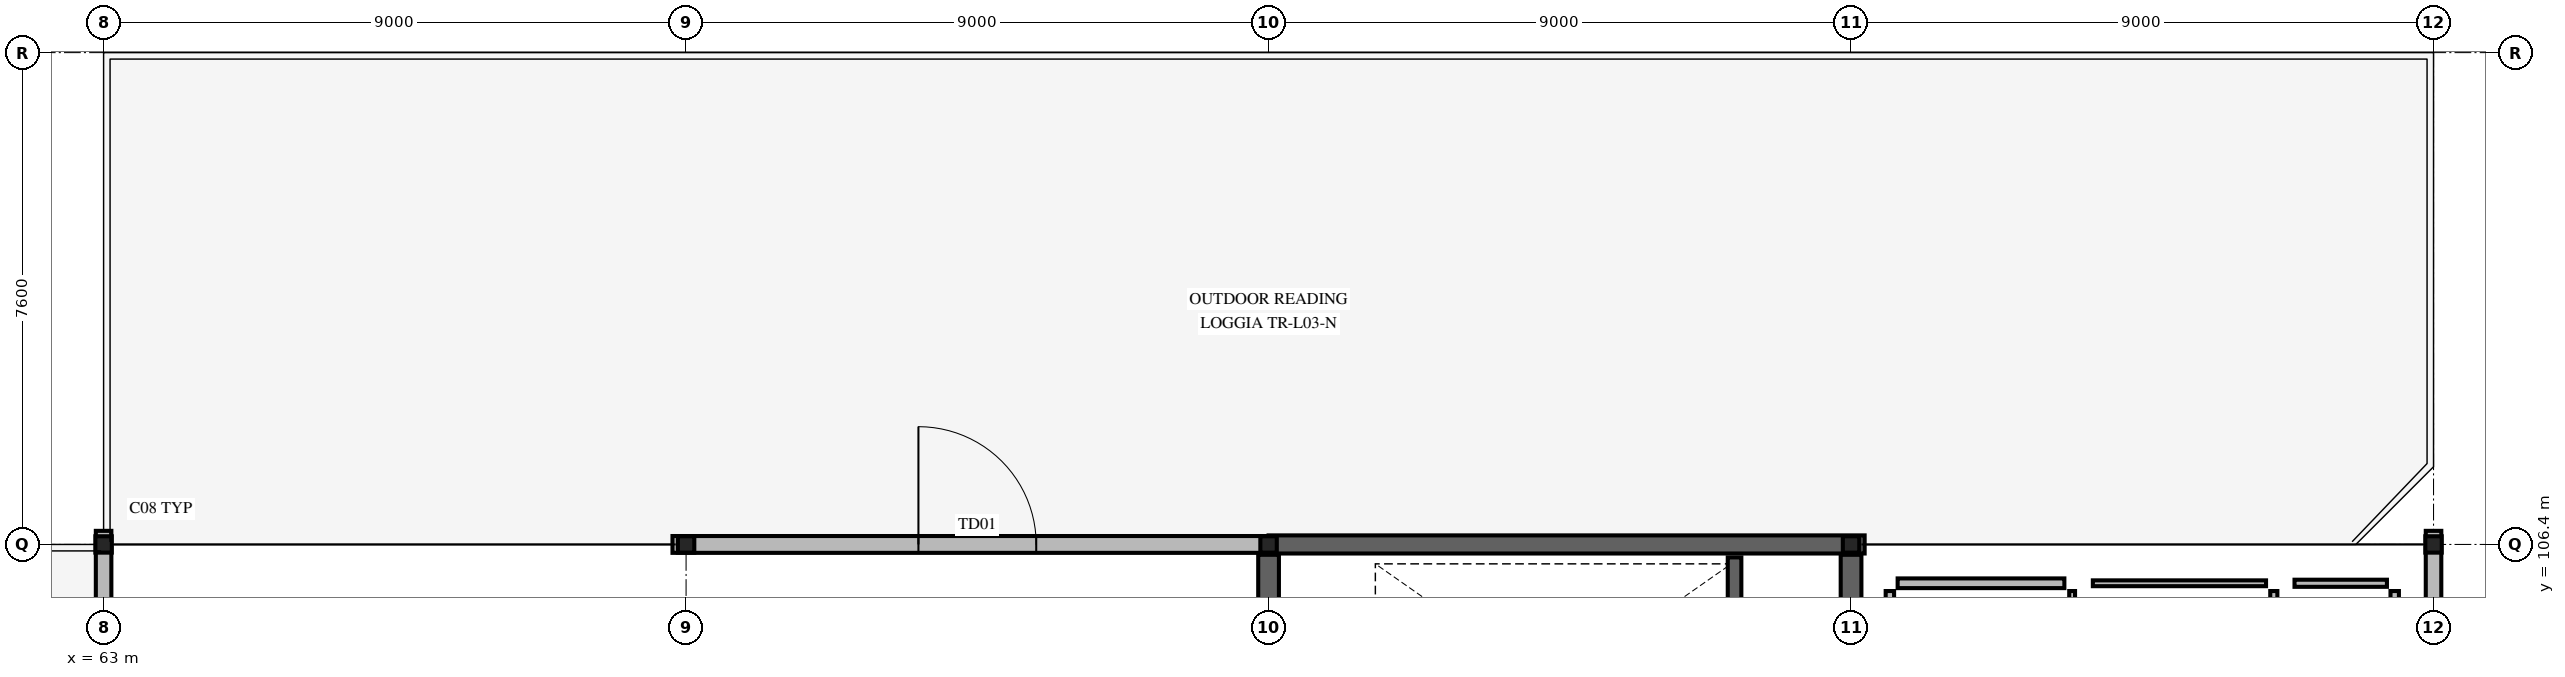
"""IFC4 building model, lengths in metres.
Left out: names, types, materials, properties, quantities, classifications, styles, units other than length and angle.
Written with IfcOpenShell. Run it as: python <this file> out.ifc"""

import sys

from ifc_helpers import new_model, si_unit, direction, frame, frame_2d, origin, origin_2d, place, context, subcontext, project, spatial, rectangle, i_section, extrude, element, fill, save


model = new_model("IFC4")
c1 = context("Model", 3, precision=1e-05, world=origin(), true_north=direction((0.0, 1.0)))
c2 = subcontext(c1, "Body", "Model", "MODEL_VIEW")
j1 = project(units=[si_unit("LENGTHUNIT", "METRE"), si_unit("PLANEANGLEUNIT", "RADIAN")], contexts=[c1])
p1 = place(None, origin())
s1 = spatial("IfcSite", under=j1, at=p1, CompositionType="ELEMENT")
p2 = place(p1, origin())
s2 = spatial("IfcBuilding", under=s1, at=p2, CompositionType="ELEMENT")
p3 = place(p2, frame((0.0, 0.0, 13.68)))
s3 = spatial("IfcBuildingStorey", under=s2, at=p3, CompositionType="ELEMENT", Elevation=13.68)
for number, where, z_axis, x_axis in (
    (1, (63.0, 106.4, 0.0), (0.0, 0.0, 1.0), (1.0, 0.0, 0.0)),
    (2, (72.0, 106.4, 0.0), (0.0, 0.0, 1.0), (1.0, 0.0, 0.0)),
    (3, (81.0, 106.4, 0.0), (0.0, 0.0, 1.0), (1.0, 0.0, 0.0)),
    (4, (90.0, 106.4, 0.0), (0.0, 0.0, 1.0), (1.0, 0.0, 0.0)),
    (5, (99.0, 106.4, 0.0), (0.0, 0.0, 1.0), (1.0, 0.0, 0.0)),
):
    element("IfcColumn", number, at=place(p3, frame(where, z_axis=z_axis, x_axis=x_axis)), inside=s3, PredefinedType="COLUMN", context=c2, shape_type="SweptSolid", body=[
        extrude(i_section(OverallWidth=0.254, OverallDepth=0.253, WebThickness=0.009, FlangeThickness=0.014, FilletRadius=0.012, at=origin_2d()), origin(), (0.0, 0.0, 1.0), 7.47),
    ])
p4 = place(p3, frame((71.79, 106.4, 0.0), z_axis=(0.0, 0.0, 1.0), x_axis=(1.0, 0.0, 0.0)))
e6 = element("IfcWall", 6, at=p4, inside=s3, PredefinedType="STANDARD", context=c2, shape_type="SweptSolid", body=[
    extrude(rectangle(XDim=9.21, YDim=0.26, at=frame_2d((4.605, 0.0))), origin(), (0.0, 0.0, 1.0), 4.08),
])
p5 = place(p4, frame((3.8, 0.0, 0.0)))
e7 = element("IfcOpeningElement", 7, at=p5, cuts=e6, PredefinedType="OPENING", context=c2, shape_type="SweptSolid", body=[
    extrude(rectangle(XDim=1.82, YDim=2.2, at=frame_2d((0.91, 1.1))), frame((0.0, 0.14, 0.0), z_axis=(0.0, -1.0, 0.0), x_axis=(1.0, 0.0, 0.0)), (0.0, 0.0, 1.0), 0.28),
])
p6 = place(p3, frame((81.0, 106.4, 0.0), z_axis=(0.0, 0.0, 1.0), x_axis=(1.0, 0.0, 0.0)))
e8 = element("IfcWall", 8, at=p6, inside=s3, PredefinedType="SOLIDWALL", context=c2, shape_type="SweptSolid", body=[
    extrude(rectangle(XDim=9.21, YDim=0.28, at=frame_2d((4.605, 0.0))), origin(), (0.0, 0.0, 1.0), 4.08),
])
p7 = place(p3, frame((63.0, 98.8, 0.0), z_axis=(0.0, 0.0, 1.0), x_axis=(0.0, 1.0, 0.0)))
e9 = element("IfcWall", 9, at=p7, inside=s3, PredefinedType="STANDARD", context=c2, shape_type="SweptSolid", body=[
    extrude(rectangle(XDim=7.81, YDim=0.24, at=frame_2d((3.905, 0.0))), origin(), (0.0, 0.0, 1.0), 3.78),
])
p8 = place(p7, frame((3.15, 0.0, 0.85)))
e10 = element("IfcOpeningElement", 10, at=p8, cuts=e9, PredefinedType="OPENING", context=c2, shape_type="SweptSolid", body=[
    extrude(rectangle(XDim=1.3, YDim=1.35, at=frame_2d((0.65, 0.675))), frame((0.0, 0.13, 0.0), z_axis=(0.0, -1.0, 0.0), x_axis=(1.0, 0.0, 0.0)), (0.0, 0.0, 1.0), 0.26),
])
p9 = place(p3, frame((99.0, 98.8, 0.0), z_axis=(0.0, 0.0, 1.0), x_axis=(0.0, 1.0, 0.0)))
e11 = element("IfcWall", 11, at=p9, inside=s3, PredefinedType="STANDARD", context=c2, shape_type="SweptSolid", body=[
    extrude(rectangle(XDim=7.81, YDim=0.24, at=frame_2d((3.905, 0.0))), origin(), (0.0, 0.0, 1.0), 3.78),
])
p10 = place(p9, frame((3.075, 0.0, 0.85)))
e12 = element("IfcOpeningElement", 12, at=p10, cuts=e11, PredefinedType="OPENING", context=c2, shape_type="SweptSolid", body=[
    extrude(rectangle(XDim=1.45, YDim=1.35, at=frame_2d((0.725, 0.675))), frame((0.0, 0.13, 0.0), z_axis=(0.0, -1.0, 0.0), x_axis=(1.0, 0.0, 0.0)), (0.0, 0.0, 1.0), 0.26),
])
for number, where, z_axis, x_axis in (
    (13, (81.0, 98.96, 0.0), (0.0, 0.0, 1.0), (0.0, 1.0, 0.0)),
    (14, (90.0, 98.96, 0.0), (0.0, 0.0, 1.0), (0.0, 1.0, 0.0)),
):
    element("IfcWall", number, at=place(p3, frame(where, z_axis=z_axis, x_axis=x_axis)), inside=s3, PredefinedType="SHEAR", context=c2, shape_type="SweptSolid", body=[
        extrude(rectangle(XDim=7.28, YDim=0.32, at=frame_2d((3.64, 0.0))), origin(), (0.0, 0.0, 1.0), 4.04),
    ])
p11 = place(p3, frame((88.2, 102.15, 0.0), z_axis=(0.0, 0.0, 1.0), x_axis=(0.0, 1.0, 0.0)))
e15 = element("IfcWall", 15, at=p11, inside=s3, PredefinedType="SOLIDWALL", context=c2, shape_type="SweptSolid", body=[
    extrude(rectangle(XDim=4.05, YDim=0.21, at=frame_2d((2.025, 0.0))), origin(), (0.0, 0.0, 1.0), 4.04),
])
p12 = place(p3, frame((90.6, 97.12, 0.0), z_axis=(0.0, 0.0, 1.0), x_axis=(0.0, 1.0, 0.0)))
e16 = element("IfcWall", 16, at=p12, inside=s3, PredefinedType="PARTITIONING", context=c2, shape_type="SweptSolid", body=[
    extrude(rectangle(XDim=8.56, YDim=0.13, at=frame_2d((4.28, 0.0))), origin(), (0.0, 0.0, 1.0), 4.04),
])
p13 = place(p3, frame((93.416, 97.12, 0.0), z_axis=(0.0, 0.0, 1.0), x_axis=(0.0, 1.0, 0.0)))
e17 = element("IfcWall", 17, at=p13, inside=s3, PredefinedType="PARTITIONING", context=c2, shape_type="SweptSolid", body=[
    extrude(rectangle(XDim=8.56, YDim=0.09, at=frame_2d((4.28, 0.0))), origin(), (0.0, 0.0, 1.0), 4.04),
])
p14 = place(p3, frame((90.72, 105.8, 0.0), z_axis=(0.0, 0.0, 1.0), x_axis=(1.0, 0.0, 0.0)))
e18 = element("IfcWall", 18, at=p14, inside=s3, PredefinedType="PARTITIONING", context=c2, shape_type="SweptSolid", body=[
    extrude(rectangle(XDim=2.576, YDim=0.15, at=frame_2d((1.288, 0.0))), origin(), (0.0, 0.0, 1.0), 4.04),
])
p15 = place(p3, frame((96.532, 97.12, 0.0), z_axis=(0.0, 0.0, 1.0), x_axis=(0.0, 1.0, 0.0)))
e19 = element("IfcWall", 19, at=p15, inside=s3, PredefinedType="PARTITIONING", context=c2, shape_type="SweptSolid", body=[
    extrude(rectangle(XDim=8.56, YDim=0.11, at=frame_2d((4.28, 0.0))), origin(), (0.0, 0.0, 1.0), 4.04),
])
p16 = place(p3, frame((93.736, 105.8, 0.0), z_axis=(0.0, 0.0, 1.0), x_axis=(1.0, 0.0, 0.0)))
e20 = element("IfcWall", 20, at=p16, inside=s3, PredefinedType="PARTITIONING", context=c2, shape_type="SweptSolid", body=[
    extrude(rectangle(XDim=2.676, YDim=0.09, at=frame_2d((1.338, 0.0))), origin(), (0.0, 0.0, 1.0), 4.04),
])
p17 = place(p3, frame((98.4, 97.12, 0.0), z_axis=(0.0, 0.0, 1.0), x_axis=(0.0, 1.0, 0.0)))
e21 = element("IfcWall", 21, at=p17, inside=s3, PredefinedType="PARTITIONING", context=c2, shape_type="SweptSolid", body=[
    extrude(rectangle(XDim=8.56, YDim=0.13, at=frame_2d((4.28, 0.0))), origin(), (0.0, 0.0, 1.0), 4.04),
])
p18 = place(p3, frame((96.852, 105.8, 0.0), z_axis=(0.0, 0.0, 1.0), x_axis=(1.0, 0.0, 0.0)))
e22 = element("IfcWall", 22, at=p18, inside=s3, PredefinedType="PARTITIONING", context=c2, shape_type="SweptSolid", body=[
    extrude(rectangle(XDim=1.428, YDim=0.11, at=frame_2d((0.714, 0.0))), origin(), (0.0, 0.0, 1.0), 4.04),
])
p19 = place(p5, origin())
e23 = element("IfcDoor", 23, at=p19, inside=s3, OperationType="SINGLE_SWING_LEFT", PredefinedType="DOOR", context=c2, shape_type="SweptSolid", body=[
    extrude(rectangle(XDim=1.82, YDim=2.2, at=frame_2d((0.91, 1.1))), frame((0.0, 0.025, 0.0), z_axis=(0.0, -1.0, 0.0), x_axis=(1.0, 0.0, 0.0)), (0.0, 0.0, 1.0), 0.05),
])
fill(e7, e23)
save(model, sys.argv[1])
